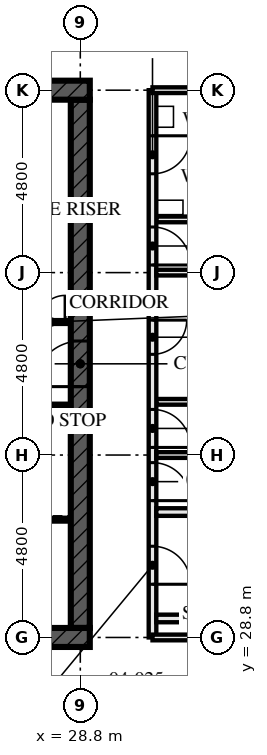
"""IFC4 building model, lengths in metres.
Left out: names, types, materials, properties, quantities, classifications, styles, units other than length and angle.
Written with IfcOpenShell. Run it as: python <this file> out.ifc"""

import sys

from ifc_helpers import new_model, si_unit, direction, frame, frame_2d, origin, place, context, subcontext, project, spatial, rectangle, extrude, element, fill, save


model = new_model("IFC4")
c1 = context("Model", 3, precision=1e-05, world=origin(), true_north=direction((0.0, 1.0)))
c2 = subcontext(c1, "Body", "Model", "MODEL_VIEW")
j1 = project(units=[si_unit("LENGTHUNIT", "METRE"), si_unit("PLANEANGLEUNIT", "RADIAN")], contexts=[c1])
p1 = place(None, origin())
s1 = spatial("IfcSite", under=j1, at=p1, CompositionType="ELEMENT")
p2 = place(p1, origin())
s2 = spatial("IfcBuilding", under=s1, at=p2, CompositionType="ELEMENT")
p3 = place(p2, frame((0.0, 0.0, 18.0)))
s3 = spatial("IfcBuildingStorey", under=s2, at=p3, CompositionType="ELEMENT", Elevation=18.0)
p4 = place(p3, frame((14.15, 28.8, -0.17), z_axis=(0.0, 0.0, 1.0), x_axis=(1.0, 0.0, 0.0)))
e1 = element("IfcWall", 1, at=p4, inside=s3, PredefinedType="SHEAR", context=c2, shape_type="SweptSolid", body=[
    extrude(rectangle(XDim=14.9, YDim=0.5, at=frame_2d((7.45, 0.0))), origin(), (0.0, 0.0, 1.0), 4.5),
])
p5 = place(p4, frame((6.85, 0.0, 0.17)))
e2 = element("IfcOpeningElement", 2, at=p5, cuts=e1, PredefinedType="OPENING", context=c2, shape_type="SweptSolid", body=[
    extrude(rectangle(XDim=1.2, YDim=2.1, at=frame_2d((0.6, 1.05))), frame((0.0, 0.26, 0.0), z_axis=(0.0, -1.0, 0.0), x_axis=(1.0, 0.0, 0.0)), (0.0, 0.0, 1.0), 0.521),
])
p6 = place(p3, frame((29.05, 43.2, -0.17), z_axis=(0.0, 0.0, 1.0), x_axis=(-1.0, 0.0, 0.0)))
e3 = element("IfcWall", 3, at=p6, inside=s3, PredefinedType="SHEAR", context=c2, shape_type="SweptSolid", body=[
    extrude(rectangle(XDim=14.9, YDim=0.5, at=frame_2d((7.45, 0.0))), origin(), (0.0, 0.0, 1.0), 4.5),
])
p7 = place(p6, frame((6.85, 0.0, 0.17)))
e4 = element("IfcOpeningElement", 4, at=p7, cuts=e3, PredefinedType="OPENING", context=c2, shape_type="SweptSolid", body=[
    extrude(rectangle(XDim=1.2, YDim=2.1, at=frame_2d((0.6, 1.05))), frame((0.0, 0.26, 0.0), z_axis=(0.0, -1.0, 0.0), x_axis=(1.0, 0.0, 0.0)), (0.0, 0.0, 1.0), 0.521),
])
p8 = place(p3, frame((28.8, 29.05, -0.17), z_axis=(0.0, 0.0, 1.0), x_axis=(0.0, 1.0, 0.0)))
e5 = element("IfcWall", 5, at=p8, inside=s3, PredefinedType="SHEAR", context=c2, shape_type="SweptSolid", body=[
    extrude(rectangle(XDim=13.9, YDim=0.5, at=frame_2d((6.95, 0.0))), origin(), (0.0, 0.0, 1.0), 4.5),
])
p9 = place(p8, frame((6.35, 0.0, 0.17)))
e6 = element("IfcOpeningElement", 6, at=p9, cuts=e5, PredefinedType="OPENING", context=c2, shape_type="SweptSolid", body=[
    extrude(rectangle(XDim=1.2, YDim=2.1, at=frame_2d((0.6, 1.05))), frame((0.0, 0.26, 0.0), z_axis=(0.0, -1.0, 0.0), x_axis=(1.0, 0.0, 0.0)), (0.0, 0.0, 1.0), 0.521),
])
for number, where, z_axis, x_axis in (
    (7, (35.5, 29.3, 0.0), (0.0, 0.0, 1.0), (-1.0, 0.0, 0.0)),
    (8, (35.5, 32.1, 0.0), (0.0, 0.0, 1.0), (-1.0, 0.0, 0.0)),
):
    element("IfcWall", number, at=place(p3, frame(where, z_axis=z_axis, x_axis=x_axis)), inside=s3, PredefinedType="SOLIDWALL", context=c2, shape_type="SweptSolid", body=[
        extrude(rectangle(XDim=4.7, YDim=0.2, at=frame_2d((2.35, 0.0))), origin(), (0.0, 0.0, 1.0), 3.99),
    ])
for number, where, z_axis, x_axis in (
    (9, (33.1, 35.0, 0.0), (0.0, 0.0, 1.0), (-1.0, 0.0, 0.0)),
    (10, (33.1, 39.8, 0.0), (0.0, 0.0, 1.0), (-1.0, 0.0, 0.0)),
):
    element("IfcWall", number, at=place(p3, frame(where, z_axis=z_axis, x_axis=x_axis)), inside=s3, PredefinedType="PARTITIONING", context=c2, shape_type="SweptSolid", body=[
        extrude(rectangle(XDim=2.3, YDim=0.15, at=frame_2d((1.15, 0.0))), origin(), (0.0, 0.0, 1.0), 4.33),
    ])
for number, where, z_axis, x_axis in (
    (11, (42.805, 33.6, 0.0), (0.0, 0.0, 1.0), (-1.0, 0.0, 0.0)),
    (12, (42.805, 38.4, 0.0), (0.0, 0.0, 1.0), (-1.0, 0.0, 0.0)),
):
    element("IfcWall", number, at=place(p3, frame(where, z_axis=z_axis, x_axis=x_axis)), inside=s3, PredefinedType="PARTITIONING", context=c2, shape_type="SweptSolid", body=[
        extrude(rectangle(XDim=12.005, YDim=0.15, at=frame_2d((6.002, 0.0))), origin(), (0.0, 0.0, 1.0), 3.55),
    ])
p10 = place(p3, frame((30.7, 28.8, 0.0), z_axis=(0.0, 0.0, 1.0), x_axis=(0.0, 1.0, 0.0)))
e13 = element("IfcWall", 13, at=p10, inside=s3, PredefinedType="PARTITIONING", context=c2, shape_type="SweptSolid", body=[
    extrude(rectangle(XDim=14.4, YDim=0.2, at=frame_2d((7.2, 0.0))), origin(), (0.0, 0.0, 1.0), 3.55),
])
p11 = place(p10, frame((1.4, 0.0, 0.0)))
e14 = element("IfcOpeningElement", 14, at=p11, cuts=e13, PredefinedType="OPENING", context=c2, shape_type="SweptSolid", body=[
    extrude(rectangle(XDim=1.0, YDim=2.1, at=frame_2d((0.5, 1.05))), frame((0.0, 0.111, 0.0), z_axis=(0.0, -1.0, 0.0), x_axis=(1.0, 0.0, 0.0)), (0.0, 0.0, 1.0), 0.221),
])
p12 = place(p10, frame((3.6, 0.0, 0.0)))
e15 = element("IfcOpeningElement", 15, at=p12, cuts=e13, PredefinedType="OPENING", context=c2, shape_type="SweptSolid", body=[
    extrude(rectangle(XDim=1.0, YDim=2.4, at=frame_2d((0.5, 1.2))), frame((0.0, 0.111, 0.0), z_axis=(0.0, -1.0, 0.0), x_axis=(1.0, 0.0, 0.0)), (0.0, 0.0, 1.0), 0.221),
])
p13 = place(p10, frame((5.0, 0.0, 0.0)))
e16 = element("IfcOpeningElement", 16, at=p13, cuts=e13, PredefinedType="OPENING", context=c2, shape_type="SweptSolid", body=[
    extrude(rectangle(XDim=1.0, YDim=2.4, at=frame_2d((0.5, 1.2))), frame((0.0, 0.111, 0.0), z_axis=(0.0, -1.0, 0.0), x_axis=(1.0, 0.0, 0.0)), (0.0, 0.0, 1.0), 0.221),
])
p14 = place(p10, frame((9.8, 0.0, 0.0)))
e17 = element("IfcOpeningElement", 17, at=p14, cuts=e13, PredefinedType="OPENING", context=c2, shape_type="SweptSolid", body=[
    extrude(rectangle(XDim=1.0, YDim=2.4, at=frame_2d((0.5, 1.2))), frame((0.0, 0.111, 0.0), z_axis=(0.0, -1.0, 0.0), x_axis=(1.0, 0.0, 0.0)), (0.0, 0.0, 1.0), 0.221),
])
p15 = place(p10, frame((7.45, 0.0, 0.0)))
e18 = element("IfcOpeningElement", 18, at=p15, cuts=e13, PredefinedType="OPENING", context=c2, shape_type="SweptSolid", body=[
    extrude(rectangle(XDim=0.9, YDim=2.1, at=frame_2d((0.45, 1.05))), frame((0.0, 0.111, 0.0), z_axis=(0.0, -1.0, 0.0), x_axis=(1.0, 0.0, 0.0)), (0.0, 0.0, 1.0), 0.221),
])
p16 = place(p10, frame((12.2, 0.0, 0.0)))
e19 = element("IfcOpeningElement", 19, at=p16, cuts=e13, PredefinedType="OPENING", context=c2, shape_type="SweptSolid", body=[
    extrude(rectangle(XDim=1.0, YDim=2.1, at=frame_2d((0.5, 1.05))), frame((0.0, 0.111, 0.0), z_axis=(0.0, -1.0, 0.0), x_axis=(1.0, 0.0, 0.0)), (0.0, 0.0, 1.0), 0.221),
])
p17 = place(p3, frame((23.05, 34.9, 0.0), z_axis=(0.0, 0.0, 1.0), x_axis=(1.0, 0.0, 0.0)))
e20 = element("IfcWall", 20, at=p17, inside=s3, PredefinedType="SOLIDWALL", context=c2, shape_type="SweptSolid", body=[
    extrude(rectangle(XDim=5.5, YDim=0.1, at=frame_2d((2.75, 0.0))), origin(), (0.0, 0.0, 1.0), 4.33),
])
p18 = place(p3, frame((22.65, 37.1, 0.0), z_axis=(0.0, 0.0, 1.0), x_axis=(1.0, 0.0, 0.0)))
e21 = element("IfcWall", 21, at=p18, inside=s3, PredefinedType="SOLIDWALL", context=c2, shape_type="SweptSolid", body=[
    extrude(rectangle(XDim=5.9, YDim=0.1, at=frame_2d((2.95, 0.0))), origin(), (0.0, 0.0, 1.0), 4.33),
])
p19 = place(p18, frame((3.5, 0.0, 0.0)))
e22 = element("IfcOpeningElement", 22, at=p19, cuts=e21, PredefinedType="OPENING", context=c2, shape_type="SweptSolid", body=[
    extrude(rectangle(XDim=0.9, YDim=2.1, at=frame_2d((0.45, 1.05))), frame((0.0, 0.061, 0.0), z_axis=(0.0, -1.0, 0.0), x_axis=(1.0, 0.0, 0.0)), (0.0, 0.0, 1.0), 0.121),
])
p20 = place(p18, frame((5.05, 0.0, 0.0)))
e23 = element("IfcOpeningElement", 23, at=p20, cuts=e21, PredefinedType="OPENING", context=c2, shape_type="SweptSolid", body=[
    extrude(rectangle(XDim=0.7, YDim=2.1, at=frame_2d((0.35, 1.05))), frame((0.0, 0.061, 0.0), z_axis=(0.0, -1.0, 0.0), x_axis=(1.0, 0.0, 0.0)), (0.0, 0.0, 1.0), 0.121),
])
p21 = place(p3, frame((23.15, 31.9, 0.0), z_axis=(0.0, 0.0, 1.0), x_axis=(1.0, 0.0, 0.0)))
e24 = element("IfcWall", 24, at=p21, inside=s3, PredefinedType="SOLIDWALL", context=c2, shape_type="SweptSolid", body=[
    extrude(rectangle(XDim=5.4, YDim=0.1, at=frame_2d((2.7, 0.0))), origin(), (0.0, 0.0, 1.0), 4.33),
])
for number, where, z_axis, x_axis in (
    (25, (33.205, 28.8, 0.0), (0.0, 0.0, 1.0), (-1.0, 0.0, 0.0)),
    (26, (33.205, 43.2, 0.0), (0.0, 0.0, 1.0), (-1.0, 0.0, 0.0)),
):
    element("IfcWall", number, at=place(p3, frame(where, z_axis=z_axis, x_axis=x_axis)), inside=s3, PredefinedType="PARTITIONING", context=c2, shape_type="SweptSolid", body=[
        extrude(rectangle(XDim=2.505, YDim=0.15, at=frame_2d((1.252, 0.0))), origin(), (0.0, 0.0, 1.0), 3.32),
    ])
p22 = place(p11, frame((1.0, 0.0, 0.0), z_axis=(0.0, 0.0, 1.0), x_axis=(-1.0, 0.0, 0.0)))
e27 = element("IfcDoor", 27, at=p22, inside=s3, OperationType="SINGLE_SWING_LEFT", PredefinedType="DOOR", context=c2, shape_type="SweptSolid", body=[
    extrude(rectangle(XDim=1.0, YDim=2.1, at=frame_2d((0.5, 1.05))), frame((0.0, 0.032, 0.0), z_axis=(0.0, -1.0, 0.0), x_axis=(1.0, 0.0, 0.0)), (0.0, 0.0, 1.0), 0.064),
])
fill(e14, e27)
p23 = place(p12, frame((1.0, 0.0, 0.0), z_axis=(0.0, 0.0, 1.0), x_axis=(-1.0, 0.0, 0.0)))
e28 = element("IfcDoor", 28, at=p23, inside=s3, OperationType="SINGLE_SWING_LEFT", PredefinedType="DOOR", context=c2, shape_type="SweptSolid", body=[
    extrude(rectangle(XDim=1.0, YDim=2.4, at=frame_2d((0.5, 1.2))), frame((0.0, 0.027, 0.0), z_axis=(0.0, -1.0, 0.0), x_axis=(1.0, 0.0, 0.0)), (0.0, 0.0, 1.0), 0.054),
])
fill(e15, e28)
p24 = place(p13, frame((1.0, 0.0, 0.0), z_axis=(0.0, 0.0, 1.0), x_axis=(-1.0, 0.0, 0.0)))
e29 = element("IfcDoor", 29, at=p24, inside=s3, OperationType="SINGLE_SWING_LEFT", PredefinedType="DOOR", context=c2, shape_type="SweptSolid", body=[
    extrude(rectangle(XDim=1.0, YDim=2.4, at=frame_2d((0.5, 1.2))), frame((0.0, 0.027, 0.0), z_axis=(0.0, -1.0, 0.0), x_axis=(1.0, 0.0, 0.0)), (0.0, 0.0, 1.0), 0.054),
])
fill(e16, e29)
p25 = place(p14, frame((1.0, 0.0, 0.0), z_axis=(0.0, 0.0, 1.0), x_axis=(-1.0, 0.0, 0.0)))
e30 = element("IfcDoor", 30, at=p25, inside=s3, OperationType="SINGLE_SWING_LEFT", PredefinedType="DOOR", context=c2, shape_type="SweptSolid", body=[
    extrude(rectangle(XDim=1.0, YDim=2.4, at=frame_2d((0.5, 1.2))), frame((0.0, 0.027, 0.0), z_axis=(0.0, -1.0, 0.0), x_axis=(1.0, 0.0, 0.0)), (0.0, 0.0, 1.0), 0.054),
])
fill(e17, e30)
p26 = place(p15, frame((0.9, 0.0, 0.0), z_axis=(0.0, 0.0, 1.0), x_axis=(-1.0, 0.0, 0.0)))
e31 = element("IfcDoor", 31, at=p26, inside=s3, OperationType="SINGLE_SWING_RIGHT", PredefinedType="DOOR", context=c2, shape_type="SweptSolid", body=[
    extrude(rectangle(XDim=0.9, YDim=2.1, at=frame_2d((0.45, 1.05))), frame((0.0, 0.027, 0.0), z_axis=(0.0, -1.0, 0.0), x_axis=(1.0, 0.0, 0.0)), (0.0, 0.0, 1.0), 0.054),
])
fill(e18, e31)
p27 = place(p16, frame((1.0, 0.0, 0.0), z_axis=(0.0, 0.0, 1.0), x_axis=(-1.0, 0.0, 0.0)))
e32 = element("IfcDoor", 32, at=p27, inside=s3, OperationType="SINGLE_SWING_RIGHT", PredefinedType="DOOR", context=c2, shape_type="SweptSolid", body=[
    extrude(rectangle(XDim=1.0, YDim=2.1, at=frame_2d((0.5, 1.05))), frame((0.0, 0.027, 0.0), z_axis=(0.0, -1.0, 0.0), x_axis=(1.0, 0.0, 0.0)), (0.0, 0.0, 1.0), 0.054),
])
fill(e19, e32)
p28 = place(p20, origin())
e33 = element("IfcDoor", 33, at=p28, inside=s3, OperationType="SINGLE_SWING_LEFT", PredefinedType="DOOR", context=c2, shape_type="SweptSolid", body=[
    extrude(rectangle(XDim=0.7, YDim=2.1, at=frame_2d((0.35, 1.05))), frame((0.0, 0.027, 0.0), z_axis=(0.0, -1.0, 0.0), x_axis=(1.0, 0.0, 0.0)), (0.0, 0.0, 1.0), 0.054),
])
fill(e23, e33)
p29 = place(p9, origin())
e34 = element("IfcDoor", 34, at=p29, inside=s3, OperationType="SINGLE_SWING_LEFT", PredefinedType="DOOR", context=c2, shape_type="SweptSolid", body=[
    extrude(rectangle(XDim=1.2, YDim=2.1, at=frame_2d((0.6, 1.05))), frame((0.0, 0.027, 0.0), z_axis=(0.0, -1.0, 0.0), x_axis=(1.0, 0.0, 0.0)), (0.0, 0.0, 1.0), 0.054),
])
fill(e6, e34)
save(model, sys.argv[1])
